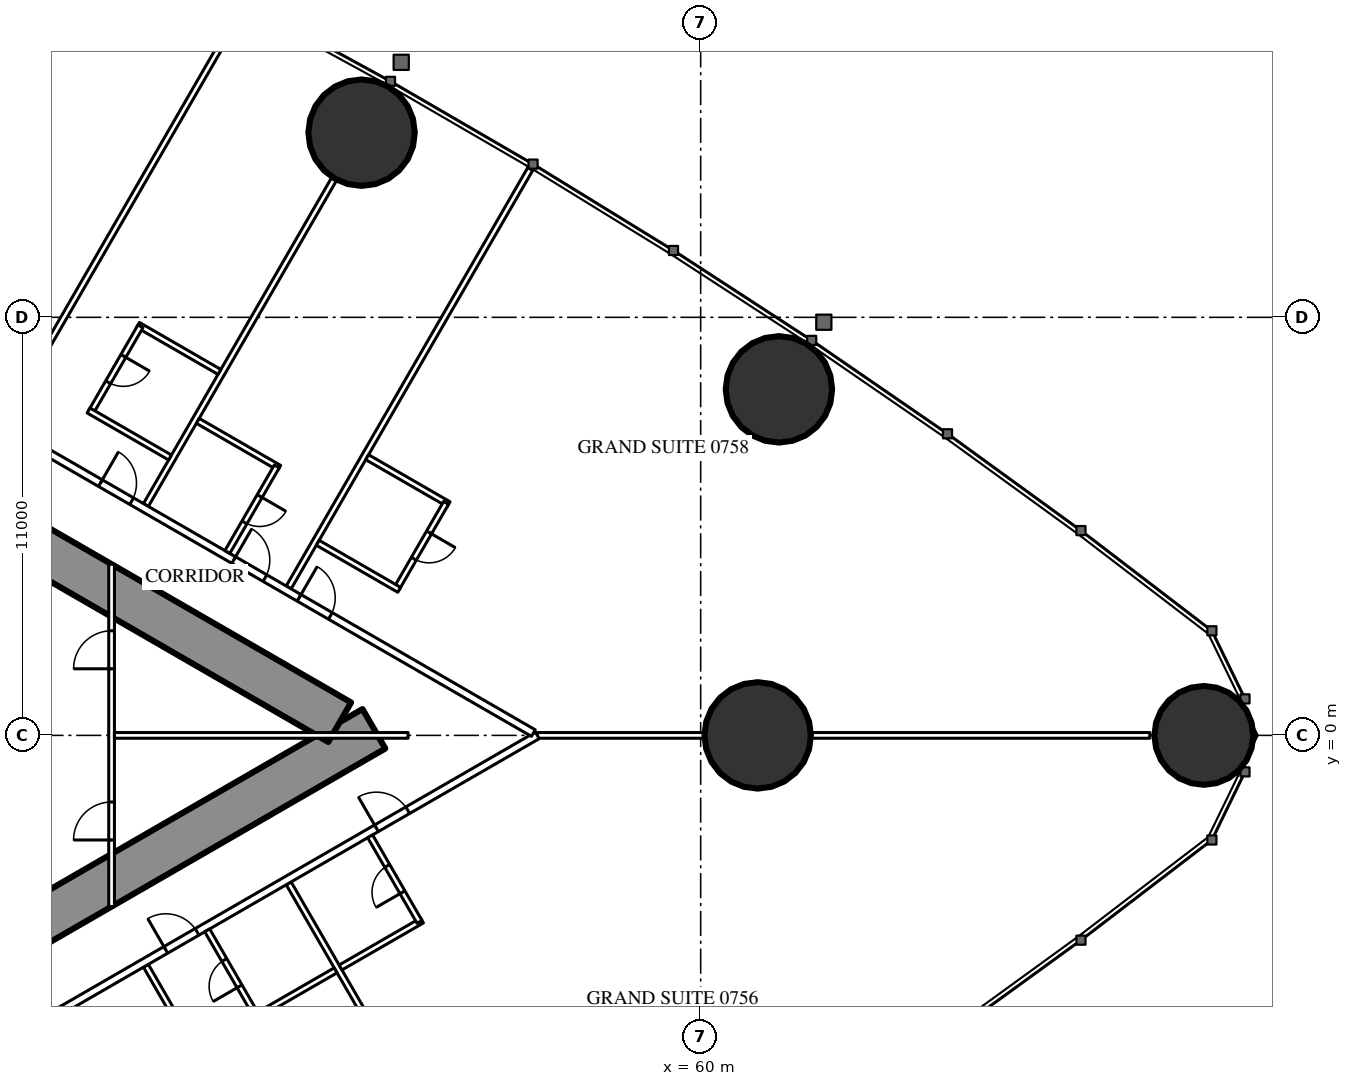
"""IFC4 building model, lengths in metres.
Left out: names, types, materials, properties, quantities, classifications, styles, units other than length and angle.
Written with IfcOpenShell. Run it as: python <this file> out.ifc"""

import sys

from ifc_helpers import new_model, si_unit, direction, frame, frame_2d, origin, origin_2d, place, context, subcontext, project, spatial, rectangle, hollow_circle, extrude, element, fill, save


model = new_model("IFC4")
c1 = context("Model", 3, precision=1e-05, world=origin(), true_north=direction((0.0, 1.0)))
c2 = subcontext(c1, "Body", "Model", "MODEL_VIEW")
j1 = project(units=[si_unit("LENGTHUNIT", "METRE"), si_unit("PLANEANGLEUNIT", "RADIAN")], contexts=[c1])
p1 = place(None, origin())
s1 = spatial("IfcSite", under=j1, at=p1, CompositionType="ELEMENT")
p2 = place(p1, origin())
s2 = spatial("IfcBuilding", under=s1, at=p2, CompositionType="ELEMENT")
p3 = place(p2, frame((0.0, 0.0, 32.0)))
s3 = spatial("IfcBuildingStorey", under=s2, at=p3, CompositionType="ELEMENT", Elevation=32.0)
p4 = place(p3, frame((73.239, 0.0, 0.0), z_axis=(0.0, 0.0, 1.0), x_axis=(1.0, 0.0, 0.0)))
e1 = element("IfcColumn", 1, at=p4, inside=s3, PredefinedType="COLUMN", context=c2, shape_type="SweptSolid", body=[
    extrude(hollow_circle(Radius=1.3, WallThickness=0.1, at=origin_2d()), origin(), (0.0, 0.0, 1.0), 3.5),
])
for number, where, z_axis, x_axis in (
    (2, (62.059, 9.105, 0.0), (0.0, 0.0, 1.0), (1.0, 0.0, 0.0)),
    (3, (51.078, 15.858, 0.0), (0.0, 0.0, 1.0), (1.0, 0.0, 0.0)),
):
    element("IfcColumn", number, at=place(p3, frame(where, z_axis=z_axis, x_axis=x_axis)), inside=s3, PredefinedType="COLUMN", context=c2, shape_type="SweptSolid", body=[
        extrude(hollow_circle(Radius=1.4, WallThickness=0.12, at=origin_2d()), origin(), (0.0, 0.0, 1.0), 3.5),
    ])
p5 = place(p3, frame((61.5, 0.0, 0.0), z_axis=(0.0, 0.0, 1.0), x_axis=(1.0, 0.0, 0.0)))
e4 = element("IfcColumn", 4, at=p5, inside=s3, PredefinedType="COLUMN", context=c2, shape_type="SweptSolid", body=[
    extrude(hollow_circle(Radius=1.4, WallThickness=0.1, at=origin_2d()), origin(), (0.0, 0.0, 1.0), 3.5),
])
p6 = place(p3, frame((27.2, -13.8, 0.0), z_axis=(0.0, 0.0, 1.0), x_axis=(0.866027159892, 0.499996958321, 0.0)))
e5 = element("IfcWall", 5, at=p6, inside=s3, PredefinedType="SHEAR", context=c2, shape_type="SweptSolid", body=[
    extrude(rectangle(XDim=27.947, YDim=1.2, at=frame_2d((13.973, 0.0))), origin(), (0.0, 0.0, 1.0), 3.5),
])
p7 = place(p6, frame((4.6, 0.0, 0.0)))
e6 = element("IfcOpeningElement", 6, at=p7, cuts=e5, PredefinedType="OPENING", context=c2, shape_type="SweptSolid", body=[
    extrude(rectangle(XDim=1.0, YDim=2.2, at=frame_2d((0.5, 1.1))), frame((0.0, 0.61, 0.0), z_axis=(0.0, -1.0, 0.0), x_axis=(1.0, 0.0, 0.0)), (0.0, 0.0, 1.0), 1.22),
])
p8 = place(p6, frame((13.395, 0.0, 0.0)))
e7 = element("IfcOpeningElement", 7, at=p8, cuts=e5, PredefinedType="OPENING", context=c2, shape_type="SweptSolid", body=[
    extrude(rectangle(XDim=1.8, YDim=2.2, at=frame_2d((0.9, 1.1))), frame((0.0, 0.61, 0.0), z_axis=(0.0, -1.0, 0.0), x_axis=(1.0, 0.0, 0.0)), (0.0, 0.0, 1.0), 1.22),
])
p9 = place(p3, frame((27.2, 13.8, 0.0), z_axis=(0.0, 0.0, 1.0), x_axis=(0.866024515034, -0.500001539357, 0.0)))
e8 = element("IfcWall", 8, at=p9, inside=s3, PredefinedType="SHEAR", context=c2, shape_type="SweptSolid", body=[
    extrude(rectangle(XDim=26.907, YDim=1.2, at=frame_2d((13.454, 0.0))), origin(), (0.0, 0.0, 1.0), 3.5),
])
p10 = place(p9, frame((4.6, 0.0, 0.0)))
e9 = element("IfcOpeningElement", 9, at=p10, cuts=e8, PredefinedType="OPENING", context=c2, shape_type="SweptSolid", body=[
    extrude(rectangle(XDim=1.0, YDim=2.2, at=frame_2d((0.5, 1.1))), frame((0.0, 0.61, 0.0), z_axis=(0.0, -1.0, 0.0), x_axis=(1.0, 0.0, 0.0)), (0.0, 0.0, 1.0), 1.22),
])
p11 = place(p9, frame((13.395, 0.0, 0.0)))
e10 = element("IfcOpeningElement", 10, at=p11, cuts=e8, PredefinedType="OPENING", context=c2, shape_type="SweptSolid", body=[
    extrude(rectangle(XDim=1.8, YDim=2.2, at=frame_2d((0.9, 1.1))), frame((0.0, 0.61, 0.0), z_axis=(0.0, -1.0, 0.0), x_axis=(1.0, 0.0, 0.0)), (0.0, 0.0, 1.0), 1.22),
])
p12 = place(p3, frame((45.403, -6.062, 0.0), z_axis=(0.0, 0.0, 1.0), x_axis=(0.500007077968, -0.866021317279, 0.0)))
e11 = element("IfcWall", 11, at=p12, inside=s3, PredefinedType="PARTITIONING", context=c2, shape_type="SweptSolid", body=[
    extrude(rectangle(XDim=12.721, YDim=0.15, at=frame_2d((6.361, 0.0))), origin(), (0.0, 0.0, 1.0), 3.25),
])
p13 = place(p3, frame((49.159, -3.893, 0.0), z_axis=(0.0, 0.0, 1.0), x_axis=(0.499998773722, -0.866026111775, 0.0)))
e12 = element("IfcWall", 12, at=p13, inside=s3, PredefinedType="PARTITIONING", context=c2, shape_type="SweptSolid", body=[
    extrude(rectangle(XDim=9.892, YDim=0.15, at=frame_2d((4.946, 0.0))), origin(), (0.0, 0.0, 1.0), 2.25),
])
p14 = place(p3, frame((41.647, 8.23, 0.0), z_axis=(0.0, 0.0, 1.0), x_axis=(0.49998590462, 0.866033541603, 0.0)))
e13 = element("IfcWall", 13, at=p14, inside=s3, PredefinedType="PARTITIONING", context=c2, shape_type="SweptSolid", body=[
    extrude(rectangle(XDim=12.621, YDim=0.15, at=frame_2d((6.311, 0.0))), origin(), (0.0, 0.0, 1.0), 3.25),
])
p15 = place(p3, frame((45.403, 6.062, 0.0), z_axis=(0.0, 0.0, 1.0), x_axis=(0.500013434677, 0.866017647131, 0.0)))
e14 = element("IfcWall", 14, at=p15, inside=s3, PredefinedType="PARTITIONING", context=c2, shape_type="SweptSolid", body=[
    extrude(rectangle(XDim=9.902, YDim=0.15, at=frame_2d((4.951, 0.0))), origin(), (0.0, 0.0, 1.0), 2.25),
])
p16 = place(p3, frame((49.159, 3.893, 0.0), z_axis=(0.0, 0.0, 1.0), x_axis=(0.499995664361, 0.866027906952, 0.0)))
e15 = element("IfcWall", 15, at=p16, inside=s3, PredefinedType="PARTITIONING", context=c2, shape_type="SweptSolid", body=[
    extrude(rectangle(XDim=12.711, YDim=0.15, at=frame_2d((6.356, 0.0))), origin(), (0.0, 0.0, 1.0), 3.25),
])
p17 = place(p3, frame((55.702, 0.0, 0.0), z_axis=(0.0, 0.0, 1.0), x_axis=(1.0, 0.0, 0.0)))
e16 = element("IfcWall", 16, at=p17, inside=s3, PredefinedType="PARTITIONING", context=c2, shape_type="SweptSolid", body=[
    extrude(rectangle(XDim=16.117, YDim=0.15, at=frame_2d((8.059, 0.0))), origin(), (0.0, 0.0, 1.0), 2.25),
])
p18 = place(p3, frame((37.96, -10.243, 0.0), z_axis=(0.0, 0.0, 1.0), x_axis=(0.866026429433, 0.499998223521, 0.0)))
e17 = element("IfcWall", 17, at=p18, inside=s3, PredefinedType="PARTITIONING", context=c2, shape_type="SweptSolid", body=[
    extrude(rectangle(XDim=20.487, YDim=0.2, at=frame_2d((10.243, 0.0))), origin(), (0.0, 0.0, 1.0), 3.25),
])
p19 = place(p18, frame((4.575, 0.0, 0.0)))
e18 = element("IfcOpeningElement", 18, at=p19, cuts=e17, PredefinedType="OPENING", context=c2, shape_type="SweptSolid", body=[
    extrude(rectangle(XDim=0.95, YDim=2.2, at=frame_2d((0.475, 1.1))), frame((0.0, 0.11, 0.0), z_axis=(0.0, -1.0, 0.0), x_axis=(1.0, 0.0, 0.0)), (0.0, 0.0, 1.0), 0.22),
])
p20 = place(p18, frame((9.199, 0.0, 0.0)))
e19 = element("IfcOpeningElement", 19, at=p20, cuts=e17, PredefinedType="OPENING", context=c2, shape_type="SweptSolid", body=[
    extrude(rectangle(XDim=0.95, YDim=2.2, at=frame_2d((0.475, 1.1))), frame((0.0, 0.11, 0.0), z_axis=(0.0, -1.0, 0.0), x_axis=(1.0, 0.0, 0.0)), (0.0, 0.0, 1.0), 0.22),
])
p21 = place(p18, frame((15.599, 0.0, 0.0)))
e20 = element("IfcOpeningElement", 20, at=p21, cuts=e17, PredefinedType="OPENING", context=c2, shape_type="SweptSolid", body=[
    extrude(rectangle(XDim=0.95, YDim=2.2, at=frame_2d((0.475, 1.1))), frame((0.0, 0.11, 0.0), z_axis=(0.0, -1.0, 0.0), x_axis=(1.0, 0.0, 0.0)), (0.0, 0.0, 1.0), 0.22),
])
p22 = place(p18, frame((2.875, 0.0, 0.0)))
e21 = element("IfcOpeningElement", 21, at=p22, cuts=e17, PredefinedType="OPENING", context=c2, shape_type="SweptSolid", body=[
    extrude(rectangle(XDim=0.95, YDim=2.2, at=frame_2d((0.475, 1.1))), frame((0.0, 0.11, 0.0), z_axis=(0.0, -1.0, 0.0), x_axis=(1.0, 0.0, 0.0)), (0.0, 0.0, 1.0), 0.22),
])
p23 = place(p3, frame((41.619, 8.131, 0.0), z_axis=(0.0, 0.0, 1.0), x_axis=(0.86603245327, -0.499987789734, 0.0)))
e22 = element("IfcWall", 22, at=p23, inside=s3, PredefinedType="PARTITIONING", context=c2, shape_type="SweptSolid", body=[
    extrude(rectangle(XDim=16.142, YDim=0.2, at=frame_2d((8.071, 0.0))), origin(), (0.0, 0.0, 1.0), 3.25),
])
p24 = place(p23, frame((9.024, 0.0, 0.0)))
e23 = element("IfcOpeningElement", 23, at=p24, cuts=e22, PredefinedType="OPENING", context=c2, shape_type="SweptSolid", body=[
    extrude(rectangle(XDim=0.95, YDim=2.2, at=frame_2d((0.475, 1.1))), frame((0.0, 0.11, 0.0), z_axis=(0.0, -1.0, 0.0), x_axis=(1.0, 0.0, 0.0)), (0.0, 0.0, 1.0), 0.22),
])
p25 = place(p23, frame((7.037, 0.0, 0.0)))
e24 = element("IfcOpeningElement", 24, at=p25, cuts=e22, PredefinedType="OPENING", context=c2, shape_type="SweptSolid", body=[
    extrude(rectangle(XDim=0.95, YDim=2.2, at=frame_2d((0.475, 1.1))), frame((0.0, 0.11, 0.0), z_axis=(0.0, -1.0, 0.0), x_axis=(1.0, 0.0, 0.0)), (0.0, 0.0, 1.0), 0.22),
])
p26 = place(p23, frame((2.987, 0.0, 0.0)))
e25 = element("IfcOpeningElement", 25, at=p26, cuts=e22, PredefinedType="OPENING", context=c2, shape_type="SweptSolid", body=[
    extrude(rectangle(XDim=0.95, YDim=2.2, at=frame_2d((0.475, 1.1))), frame((0.0, 0.11, 0.0), z_axis=(0.0, -1.0, 0.0), x_axis=(1.0, 0.0, 0.0)), (0.0, 0.0, 1.0), 0.22),
])
p27 = place(p3, frame((48.251, -7.42, 0.0), z_axis=(0.0, 0.0, 1.0), x_axis=(0.866006523861, 0.500032699561, 0.0)))
e26 = element("IfcWall", 26, at=p27, inside=s3, PredefinedType="PARTITIONING", context=c2, shape_type="SweptSolid", body=[
    extrude(rectangle(XDim=2.475, YDim=0.15, at=frame_2d((1.237, 0.0))), origin(), (0.0, 0.0, 1.0), 3.25),
])
p28 = place(p3, frame((47.016, -5.13, 0.0), z_axis=(0.0, 0.0, 1.0), x_axis=(0.500006934395, -0.866021400173, 0.0)))
e27 = element("IfcWall", 27, at=p28, inside=s3, PredefinedType="PARTITIONING", context=c2, shape_type="SweptSolid", body=[
    extrude(rectangle(XDim=2.6, YDim=0.15, at=frame_2d((1.3, 0.0))), origin(), (0.0, 0.0, 1.0), 3.25),
])
p29 = place(p28, frame((0.9, 0.0, 0.0)))
e28 = element("IfcOpeningElement", 28, at=p29, cuts=e27, PredefinedType="OPENING", context=c2, shape_type="SweptSolid", body=[
    extrude(rectangle(XDim=0.8, YDim=2.2, at=frame_2d((0.4, 1.1))), frame((0.0, 0.085, 0.0), z_axis=(0.0, -1.0, 0.0), x_axis=(1.0, 0.0, 0.0)), (0.0, 0.0, 1.0), 0.17),
])
p30 = place(p3, frame((50.524, -6.107, 0.0), z_axis=(0.0, 0.0, 1.0), x_axis=(0.866031185235, 0.4999899861, 0.0)))
e29 = element("IfcWall", 29, at=p30, inside=s3, PredefinedType="PARTITIONING", context=c2, shape_type="SweptSolid", body=[
    extrude(rectangle(XDim=2.475, YDim=0.15, at=frame_2d((1.238, 0.0))), origin(), (0.0, 0.0, 1.0), 3.25),
])
p31 = place(p3, frame((51.303, -2.656, 0.0), z_axis=(0.0, 0.0, 1.0), x_axis=(0.500047596559, -0.865997922154, 0.0)))
e30 = element("IfcWall", 30, at=p31, inside=s3, PredefinedType="PARTITIONING", context=c2, shape_type="SweptSolid", body=[
    extrude(rectangle(XDim=2.6, YDim=0.15, at=frame_2d((1.3, 0.0))), origin(), (0.0, 0.0, 1.0), 3.25),
])
p32 = place(p31, frame((0.9, 0.0, 0.0)))
e31 = element("IfcOpeningElement", 31, at=p32, cuts=e30, PredefinedType="OPENING", context=c2, shape_type="SweptSolid", body=[
    extrude(rectangle(XDim=0.8, YDim=2.2, at=frame_2d((0.4, 1.1))), frame((0.0, 0.085, 0.0), z_axis=(0.0, -1.0, 0.0), x_axis=(1.0, 0.0, 0.0)), (0.0, 0.0, 1.0), 0.17),
])
p33 = place(p3, frame((51.224, 7.32, 0.0), z_axis=(0.0, 0.0, 1.0), x_axis=(0.866031185235, -0.4999899861, 0.0)))
e32 = element("IfcWall", 32, at=p33, inside=s3, PredefinedType="PARTITIONING", context=c2, shape_type="SweptSolid", body=[
    extrude(rectangle(XDim=2.475, YDim=0.15, at=frame_2d((1.238, 0.0))), origin(), (0.0, 0.0, 1.0), 3.25),
])
p34 = place(p3, frame((52.003, 3.868, 0.0), z_axis=(0.0, 0.0, 1.0), x_axis=(0.500047596559, 0.865997922154, 0.0)))
e33 = element("IfcWall", 33, at=p34, inside=s3, PredefinedType="PARTITIONING", context=c2, shape_type="SweptSolid", body=[
    extrude(rectangle(XDim=2.6, YDim=0.15, at=frame_2d((1.3, 0.0))), origin(), (0.0, 0.0, 1.0), 3.25),
])
p35 = place(p34, frame((0.9, 0.0, 0.0)))
e34 = element("IfcOpeningElement", 34, at=p35, cuts=e33, PredefinedType="OPENING", context=c2, shape_type="SweptSolid", body=[
    extrude(rectangle(XDim=0.8, YDim=2.2, at=frame_2d((0.4, 1.1))), frame((0.0, 0.085, 0.0), z_axis=(0.0, -1.0, 0.0), x_axis=(1.0, 0.0, 0.0)), (0.0, 0.0, 1.0), 0.17),
])
p36 = place(p3, frame((49.925, 5.068, 0.0), z_axis=(0.0, 0.0, 1.0), x_axis=(0.866006523861, -0.500032699561, 0.0)))
e35 = element("IfcWall", 35, at=p36, inside=s3, PredefinedType="PARTITIONING", context=c2, shape_type="SweptSolid", body=[
    extrude(rectangle(XDim=2.475, YDim=0.15, at=frame_2d((1.237, 0.0))), origin(), (0.0, 0.0, 1.0), 3.25),
])
p37 = place(p3, frame((46.768, 8.276, 0.0), z_axis=(0.0, 0.0, 1.0), x_axis=(0.866031185235, -0.4999899861, 0.0)))
e36 = element("IfcWall", 36, at=p37, inside=s3, PredefinedType="PARTITIONING", context=c2, shape_type="SweptSolid", body=[
    extrude(rectangle(XDim=2.475, YDim=0.15, at=frame_2d((1.238, 0.0))), origin(), (0.0, 0.0, 1.0), 3.25),
])
p38 = place(p3, frame((47.546, 4.824, 0.0), z_axis=(0.0, 0.0, 1.0), x_axis=(0.500006934395, 0.866021400173, 0.0)))
e37 = element("IfcWall", 37, at=p38, inside=s3, PredefinedType="PARTITIONING", context=c2, shape_type="SweptSolid", body=[
    extrude(rectangle(XDim=2.6, YDim=0.15, at=frame_2d((1.3, 0.0))), origin(), (0.0, 0.0, 1.0), 3.25),
])
p39 = place(p38, frame((0.9, 0.0, 0.0)))
e38 = element("IfcOpeningElement", 38, at=p39, cuts=e37, PredefinedType="OPENING", context=c2, shape_type="SweptSolid", body=[
    extrude(rectangle(XDim=0.8, YDim=2.2, at=frame_2d((0.4, 1.1))), frame((0.0, 0.085, 0.0), z_axis=(0.0, -1.0, 0.0), x_axis=(1.0, 0.0, 0.0)), (0.0, 0.0, 1.0), 0.17),
])
p40 = place(p3, frame((45.195, 10.801, 0.0), z_axis=(0.0, 0.0, 1.0), x_axis=(0.86604923931, -0.499958713387, 0.0)))
e39 = element("IfcWall", 39, at=p40, inside=s3, PredefinedType="PARTITIONING", context=c2, shape_type="SweptSolid", body=[
    extrude(rectangle(XDim=2.475, YDim=0.15, at=frame_2d((1.237, 0.0))), origin(), (0.0, 0.0, 1.0), 3.25),
])
p41 = place(p3, frame((43.959, 8.512, 0.0), z_axis=(0.0, 0.0, 1.0), x_axis=(0.500006934395, 0.866021400173, 0.0)))
e40 = element("IfcWall", 40, at=p41, inside=s3, PredefinedType="PARTITIONING", context=c2, shape_type="SweptSolid", body=[
    extrude(rectangle(XDim=2.6, YDim=0.15, at=frame_2d((1.3, 0.0))), origin(), (0.0, 0.0, 1.0), 3.25),
])
p42 = place(p41, frame((0.9, 0.0, 0.0)))
e41 = element("IfcOpeningElement", 41, at=p42, cuts=e40, PredefinedType="OPENING", context=c2, shape_type="SweptSolid", body=[
    extrude(rectangle(XDim=0.8, YDim=2.2, at=frame_2d((0.4, 1.1))), frame((0.0, 0.085, 0.0), z_axis=(0.0, -1.0, 0.0), x_axis=(1.0, 0.0, 0.0)), (0.0, 0.0, 1.0), 0.17),
])
p43 = place(p3, frame((43.895, 8.549, 0.0), z_axis=(0.0, 0.0, 1.0), x_axis=(0.866031185235, -0.4999899861, 0.0)))
e42 = element("IfcWall", 42, at=p43, inside=s3, PredefinedType="PARTITIONING", context=c2, shape_type="SweptSolid", body=[
    extrude(rectangle(XDim=2.475, YDim=0.15, at=frame_2d((1.238, 0.0))), origin(), (0.0, 0.0, 1.0), 3.25),
])
p44 = place(p3, frame((44.5, -4.505, 0.0), z_axis=(0.0, 0.0, 1.0), x_axis=(0.0, 1.0, 0.0)))
e43 = element("IfcWall", 43, at=p44, inside=s3, PredefinedType="PARTITIONING", context=c2, shape_type="SweptSolid", body=[
    extrude(rectangle(XDim=9.009, YDim=0.15, at=frame_2d((4.505, 0.0))), origin(), (0.0, 0.0, 1.0), 2.45),
])
p45 = place(p44, frame((1.752, 0.0, 0.0)))
e44 = element("IfcOpeningElement", 44, at=p45, cuts=e43, PredefinedType="OPENING", context=c2, shape_type="SweptSolid", body=[
    extrude(rectangle(XDim=1.0, YDim=2.2, at=frame_2d((0.5, 1.1))), frame((0.0, 0.085, 0.0), z_axis=(0.0, -1.0, 0.0), x_axis=(1.0, 0.0, 0.0)), (0.0, 0.0, 1.0), 0.17),
])
p46 = place(p44, frame((6.257, 0.0, 0.0)))
e45 = element("IfcOpeningElement", 45, at=p46, cuts=e43, PredefinedType="OPENING", context=c2, shape_type="SweptSolid", body=[
    extrude(rectangle(XDim=1.0, YDim=2.2, at=frame_2d((0.5, 1.1))), frame((0.0, 0.085, 0.0), z_axis=(0.0, -1.0, 0.0), x_axis=(1.0, 0.0, 0.0)), (0.0, 0.0, 1.0), 0.17),
])
p47 = place(p3, frame((44.575, 0.0, 0.0), z_axis=(0.0, 0.0, 1.0), x_axis=(1.0, 0.0, 0.0)))
e46 = element("IfcWall", 46, at=p47, inside=s3, PredefinedType="PARTITIONING", context=c2, shape_type="SweptSolid", body=[
    extrude(rectangle(XDim=7.727, YDim=0.15, at=frame_2d((3.864, 0.0))), origin(), (0.0, 0.0, 1.0), 2.25),
])
p48 = place(p29, origin())
e47 = element("IfcDoor", 47, at=p48, inside=s3, OperationType="SINGLE_SWING_RIGHT", PredefinedType="DOOR", context=c2, shape_type="SweptSolid", body=[
    extrude(rectangle(XDim=0.8, YDim=2.2, at=frame_2d((0.4, 1.1))), frame((0.0, 0.025, 0.0), z_axis=(0.0, -1.0, 0.0), x_axis=(1.0, 0.0, 0.0)), (0.0, 0.0, 1.0), 0.05),
])
fill(e28, e47)
p49 = place(p20, origin())
e48 = element("IfcDoor", 48, at=p49, inside=s3, OperationType="SINGLE_SWING_LEFT", PredefinedType="DOOR", context=c2, shape_type="SweptSolid", body=[
    extrude(rectangle(XDim=0.95, YDim=2.2, at=frame_2d((0.475, 1.1))), frame((0.0, 0.025, 0.0), z_axis=(0.0, -1.0, 0.0), x_axis=(1.0, 0.0, 0.0)), (0.0, 0.0, 1.0), 0.05),
])
fill(e19, e48)
p50 = place(p32, origin())
e49 = element("IfcDoor", 49, at=p50, inside=s3, OperationType="SINGLE_SWING_RIGHT", PredefinedType="DOOR", context=c2, shape_type="SweptSolid", body=[
    extrude(rectangle(XDim=0.8, YDim=2.2, at=frame_2d((0.4, 1.1))), frame((0.0, 0.025, 0.0), z_axis=(0.0, -1.0, 0.0), x_axis=(1.0, 0.0, 0.0)), (0.0, 0.0, 1.0), 0.05),
])
fill(e31, e49)
p51 = place(p21, origin())
e50 = element("IfcDoor", 50, at=p51, inside=s3, OperationType="SINGLE_SWING_LEFT", PredefinedType="DOOR", context=c2, shape_type="SweptSolid", body=[
    extrude(rectangle(XDim=0.95, YDim=2.2, at=frame_2d((0.475, 1.1))), frame((0.0, 0.025, 0.0), z_axis=(0.0, -1.0, 0.0), x_axis=(1.0, 0.0, 0.0)), (0.0, 0.0, 1.0), 0.05),
])
fill(e20, e50)
p52 = place(p35, origin())
e51 = element("IfcDoor", 51, at=p52, inside=s3, OperationType="SINGLE_SWING_RIGHT", PredefinedType="DOOR", context=c2, shape_type="SweptSolid", body=[
    extrude(rectangle(XDim=0.8, YDim=2.2, at=frame_2d((0.4, 1.1))), frame((0.0, 0.025, 0.0), z_axis=(0.0, -1.0, 0.0), x_axis=(1.0, 0.0, 0.0)), (0.0, 0.0, 1.0), 0.05),
])
fill(e34, e51)
p53 = place(p24, origin())
e52 = element("IfcDoor", 52, at=p53, inside=s3, OperationType="SINGLE_SWING_LEFT", PredefinedType="DOOR", context=c2, shape_type="SweptSolid", body=[
    extrude(rectangle(XDim=0.95, YDim=2.2, at=frame_2d((0.475, 1.1))), frame((0.0, 0.025, 0.0), z_axis=(0.0, -1.0, 0.0), x_axis=(1.0, 0.0, 0.0)), (0.0, 0.0, 1.0), 0.05),
])
fill(e23, e52)
p54 = place(p39, origin())
e53 = element("IfcDoor", 53, at=p54, inside=s3, OperationType="SINGLE_SWING_RIGHT", PredefinedType="DOOR", context=c2, shape_type="SweptSolid", body=[
    extrude(rectangle(XDim=0.8, YDim=2.2, at=frame_2d((0.4, 1.1))), frame((0.0, 0.025, 0.0), z_axis=(0.0, -1.0, 0.0), x_axis=(1.0, 0.0, 0.0)), (0.0, 0.0, 1.0), 0.05),
])
fill(e38, e53)
p55 = place(p25, origin())
e54 = element("IfcDoor", 54, at=p55, inside=s3, OperationType="SINGLE_SWING_LEFT", PredefinedType="DOOR", context=c2, shape_type="SweptSolid", body=[
    extrude(rectangle(XDim=0.95, YDim=2.2, at=frame_2d((0.475, 1.1))), frame((0.0, 0.025, 0.0), z_axis=(0.0, -1.0, 0.0), x_axis=(1.0, 0.0, 0.0)), (0.0, 0.0, 1.0), 0.05),
])
fill(e24, e54)
p56 = place(p42, origin())
e55 = element("IfcDoor", 55, at=p56, inside=s3, OperationType="SINGLE_SWING_RIGHT", PredefinedType="DOOR", context=c2, shape_type="SweptSolid", body=[
    extrude(rectangle(XDim=0.8, YDim=2.2, at=frame_2d((0.4, 1.1))), frame((0.0, 0.025, 0.0), z_axis=(0.0, -1.0, 0.0), x_axis=(1.0, 0.0, 0.0)), (0.0, 0.0, 1.0), 0.05),
])
fill(e41, e55)
p57 = place(p26, origin())
e56 = element("IfcDoor", 56, at=p57, inside=s3, OperationType="SINGLE_SWING_LEFT", PredefinedType="DOOR", context=c2, shape_type="SweptSolid", body=[
    extrude(rectangle(XDim=0.95, YDim=2.2, at=frame_2d((0.475, 1.1))), frame((0.0, 0.025, 0.0), z_axis=(0.0, -1.0, 0.0), x_axis=(1.0, 0.0, 0.0)), (0.0, 0.0, 1.0), 0.05),
])
fill(e25, e56)
p58 = place(p45, origin())
e57 = element("IfcDoor", 57, at=p58, inside=s3, OperationType="SINGLE_SWING_LEFT", PredefinedType="DOOR", context=c2, shape_type="SweptSolid", body=[
    extrude(rectangle(XDim=1.0, YDim=2.2, at=frame_2d((0.5, 1.1))), frame((0.0, 0.025, 0.0), z_axis=(0.0, -1.0, 0.0), x_axis=(1.0, 0.0, 0.0)), (0.0, 0.0, 1.0), 0.05),
])
fill(e44, e57)
p59 = place(p46, origin())
e58 = element("IfcDoor", 58, at=p59, inside=s3, OperationType="SINGLE_SWING_LEFT", PredefinedType="DOOR", context=c2, shape_type="SweptSolid", body=[
    extrude(rectangle(XDim=1.0, YDim=2.2, at=frame_2d((0.5, 1.1))), frame((0.0, 0.025, 0.0), z_axis=(0.0, -1.0, 0.0), x_axis=(1.0, 0.0, 0.0)), (0.0, 0.0, 1.0), 0.05),
])
fill(e45, e58)
save(model, sys.argv[1])
